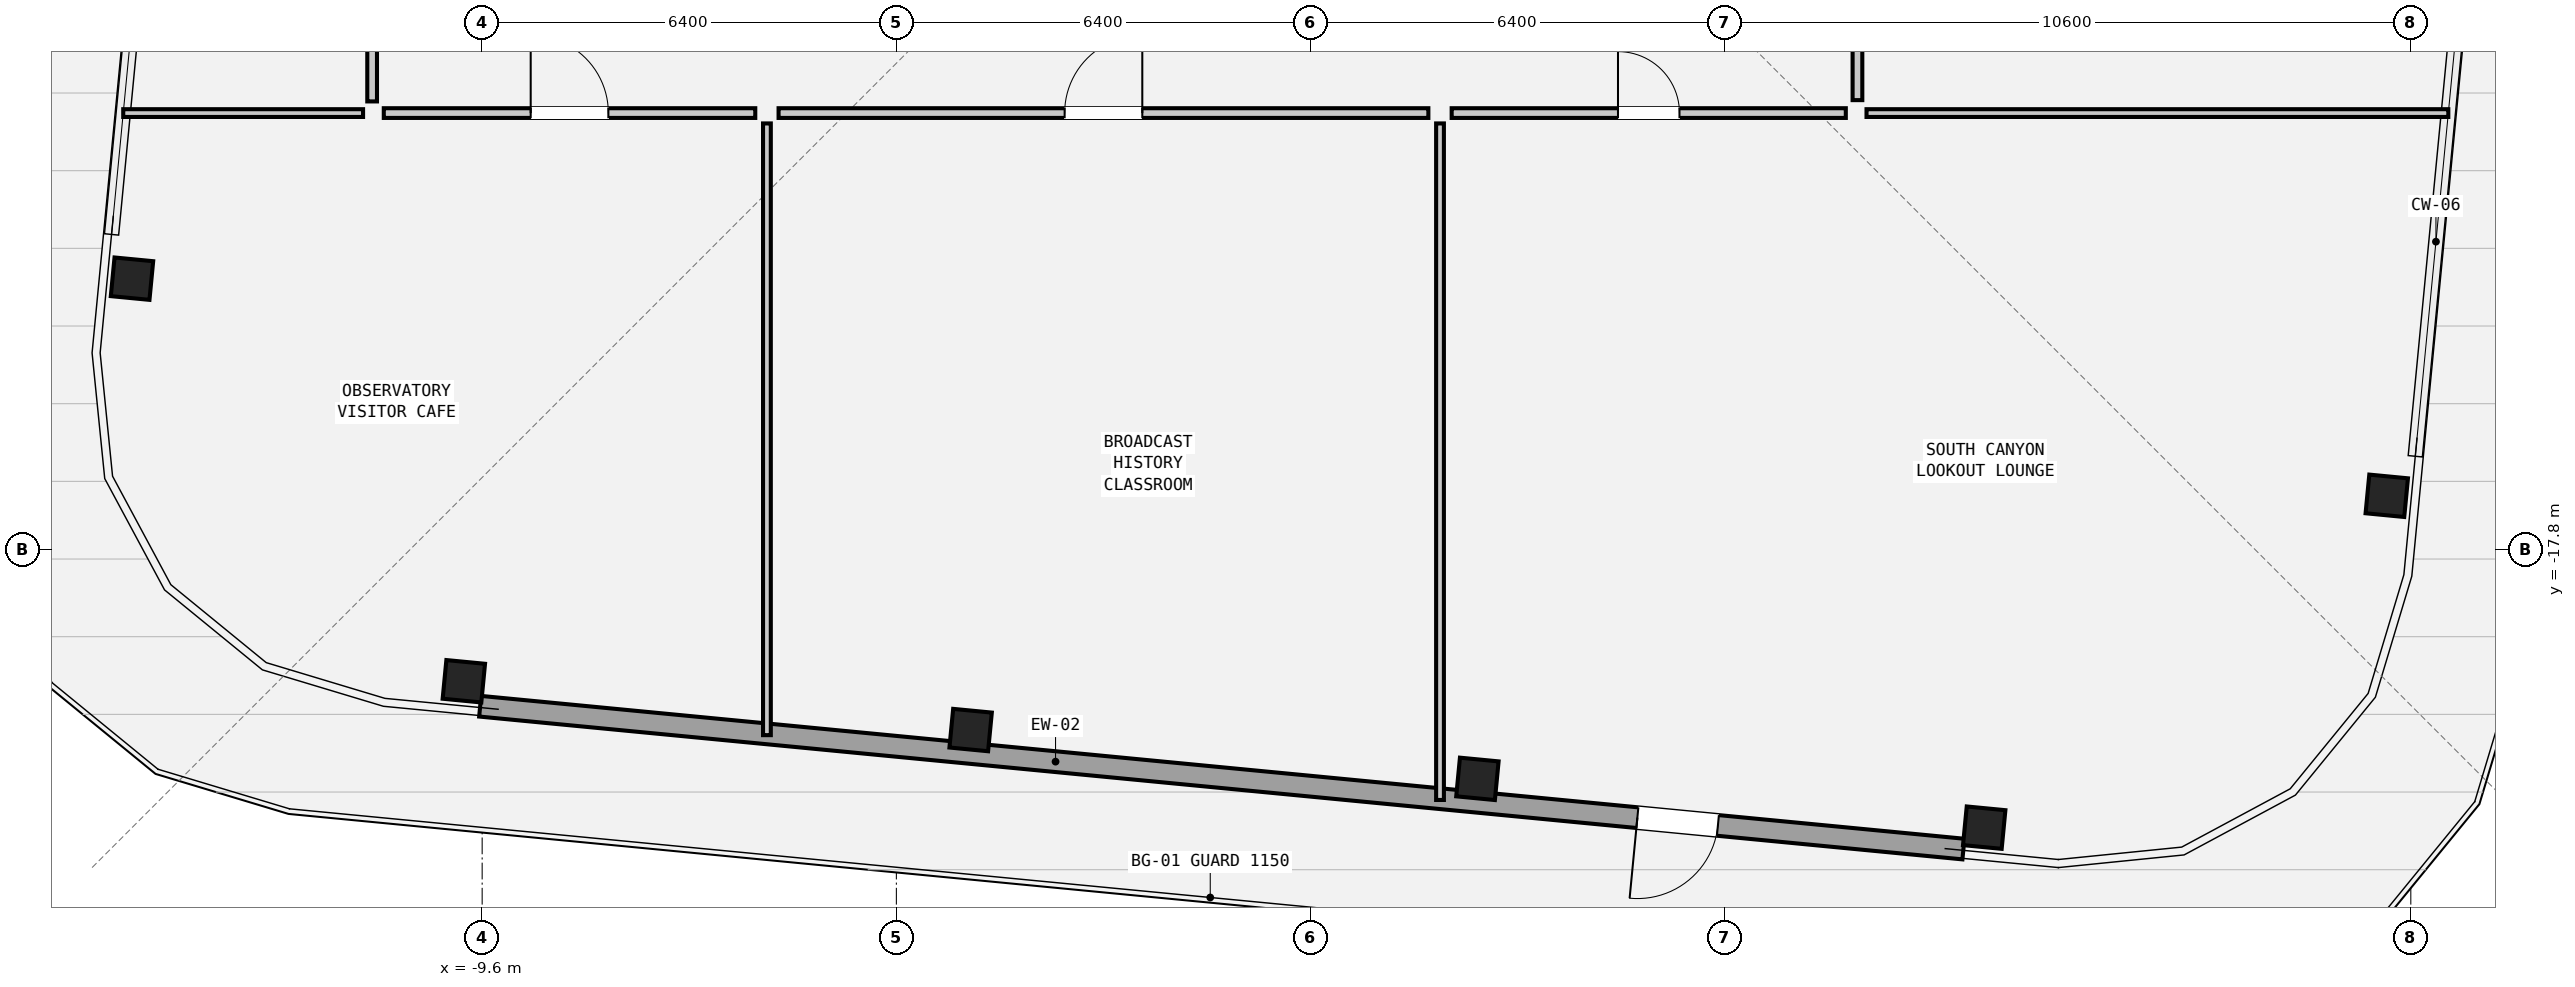
"""IFC4 building model, lengths in metres.
Left out: names, types, materials, properties, quantities, classifications, styles, units other than length and angle.
Written with IfcOpenShell. Run it as: python <this file> out.ifc"""

import sys

from ifc_helpers import new_model, si_unit, direction, frame, frame_2d, origin, origin_2d, place, context, subcontext, project, spatial, rectangle, hollow_rectangle, extrude, element, fill, save


model = new_model("IFC4")
c1 = context("Model", 3, precision=1e-05, world=origin(), true_north=direction((0.0, 1.0)))
c2 = subcontext(c1, "Body", "Model", "MODEL_VIEW")
j1 = project(units=[si_unit("LENGTHUNIT", "METRE"), si_unit("PLANEANGLEUNIT", "RADIAN")], contexts=[c1])
p1 = place(None, origin())
s1 = spatial("IfcSite", under=j1, at=p1, CompositionType="ELEMENT")
p2 = place(p1, origin())
s2 = spatial("IfcBuilding", under=s1, at=p2, CompositionType="ELEMENT")
p3 = place(p2, frame((0.0, 0.0, 280.55)))
s3 = spatial("IfcBuildingStorey", under=s2, at=p3, CompositionType="ELEMENT", Elevation=280.55)
for number, where, z_axis, x_axis in (
    (1, (-9.883, -19.829, 0.0), (0.0, 0.0, 1.0), (0.995, -0.096, 0.0)),
    (2, (-2.052, -20.583, 0.0), (0.0, 0.0, 1.0), (0.995, -0.096, 0.0)),
    (3, (5.778, -21.336, 0.0), (0.0, 0.0, 1.0), (0.995, -0.096, 0.0)),
    (4, (13.608, -22.09, 0.0), (0.0, 0.0, 1.0), (0.995, -0.096, 0.0)),
    (5, (19.829, -16.963, 0.0), (0.0, 0.0, 1.0), (0.096, 0.995, 0.0)),
    (6, (-15.01, -13.608, 0.0), (0.0, 0.0, 1.0), (0.096, 0.995, 0.0)),
):
    element("IfcColumn", number, at=place(p3, frame(where, z_axis=z_axis, x_axis=x_axis)), inside=s3, PredefinedType="COLUMN", context=c2, shape_type="SweptSolid", body=[
        extrude(hollow_rectangle(XDim=0.6, YDim=0.6, WallThickness=0.04, at=origin_2d()), origin(), (0.0, 0.0, 1.0), 4.35),
    ])
p4 = place(p3, frame((13.287, -22.421, 0.0), z_axis=(0.0, 0.0, 1.0), x_axis=(-0.995396042099, 0.095847375411, 0.0)))
e7 = element("IfcWall", 7, at=p4, inside=s3, PredefinedType="SOLIDWALL", context=c2, shape_type="SweptSolid", body=[
    extrude(rectangle(XDim=23.024, YDim=0.32, at=frame_2d((11.512, 0.0))), origin(), (0.0, 0.0, 1.0), 2.25),
])
p5 = place(p4, frame((3.811, 0.0, 0.0)))
e8 = element("IfcOpeningElement", 8, at=p5, cuts=e7, PredefinedType="OPENING", context=c2, shape_type="SweptSolid", body=[
    extrude(rectangle(XDim=1.25, YDim=2.02, at=frame_2d((0.625, 1.01))), frame((0.0, 0.172, 0.0), z_axis=(0.0, -1.0, 0.0), x_axis=(1.0, 0.0, 0.0)), (0.0, 0.0, 1.0), 0.344),
])
p6 = place(p3, frame((-15.146, -11.05, 0.0), z_axis=(0.0, 0.0, 1.0), x_axis=(1.0, 0.0, 0.0)))
e9 = element("IfcWall", 9, at=p6, inside=s3, PredefinedType="PARTITIONING", context=c2, shape_type="SweptSolid", body=[
    extrude(rectangle(XDim=3.706, YDim=0.12, at=frame_2d((1.853, 0.0))), origin(), (0.0, 0.0, 1.0), 4.07),
])
p7 = place(p3, frame((11.79, -11.05, 0.0), z_axis=(0.0, 0.0, 1.0), x_axis=(1.0, 0.0, 0.0)))
e10 = element("IfcWall", 10, at=p7, inside=s3, PredefinedType="PARTITIONING", context=c2, shape_type="SweptSolid", body=[
    extrude(rectangle(XDim=8.99, YDim=0.12, at=frame_2d((4.495, 0.0))), origin(), (0.0, 0.0, 1.0), 4.07),
])
p8 = place(p3, frame((-5.2, -20.661, 0.0), z_axis=(0.0, 0.0, 1.0), x_axis=(0.0, 1.0, 0.0)))
e11 = element("IfcWall", 11, at=p8, inside=s3, PredefinedType="PARTITIONING", context=c2, shape_type="SweptSolid", body=[
    extrude(rectangle(XDim=9.451, YDim=0.12, at=frame_2d((4.726, 0.0))), origin(), (0.0, 0.0, 1.0), 2.25),
])
p9 = place(p3, frame((5.2, -21.663, 0.0), z_axis=(0.0, 0.0, 1.0), x_axis=(0.0, 1.0, 0.0)))
e12 = element("IfcWall", 12, at=p9, inside=s3, PredefinedType="PARTITIONING", context=c2, shape_type="SweptSolid", body=[
    extrude(rectangle(XDim=10.453, YDim=0.12, at=frame_2d((5.226, 0.0))), origin(), (0.0, 0.0, 1.0), 2.25),
])
p10 = place(p3, frame((-11.12, -11.05, 0.0), z_axis=(0.0, 0.0, 1.0), x_axis=(1.0, 0.0, 0.0)))
e13 = element("IfcWall", 13, at=p10, inside=s3, PredefinedType="PARTITIONING", context=c2, shape_type="SweptSolid", body=[
    extrude(rectangle(XDim=5.74, YDim=0.15, at=frame_2d((2.87, 0.0))), origin(), (0.0, 0.0, 1.0), 4.07),
])
p11 = place(p10, frame((2.27, 0.0, 0.0)))
e14 = element("IfcOpeningElement", 14, at=p11, cuts=e13, PredefinedType="OPENING", context=c2, shape_type="SweptSolid", body=[
    extrude(rectangle(XDim=1.2, YDim=2.1, at=frame_2d((0.6, 1.05))), frame((0.0, 0.087, 0.0), z_axis=(0.0, -1.0, 0.0), x_axis=(1.0, 0.0, 0.0)), (0.0, 0.0, 1.0), 0.174),
])
p12 = place(p3, frame((-5.02, -11.05, 0.0), z_axis=(0.0, 0.0, 1.0), x_axis=(1.0, 0.0, 0.0)))
e15 = element("IfcWall", 15, at=p12, inside=s3, PredefinedType="PARTITIONING", context=c2, shape_type="SweptSolid", body=[
    extrude(rectangle(XDim=10.04, YDim=0.15, at=frame_2d((5.02, 0.0))), origin(), (0.0, 0.0, 1.0), 4.07),
])
p13 = place(p12, frame((4.42, 0.0, 0.0)))
e16 = element("IfcOpeningElement", 16, at=p13, cuts=e15, PredefinedType="OPENING", context=c2, shape_type="SweptSolid", body=[
    extrude(rectangle(XDim=1.2, YDim=2.1, at=frame_2d((0.6, 1.05))), frame((0.0, 0.087, 0.0), z_axis=(0.0, -1.0, 0.0), x_axis=(1.0, 0.0, 0.0)), (0.0, 0.0, 1.0), 0.174),
])
p14 = place(p3, frame((5.38, -11.05, 0.0), z_axis=(0.0, 0.0, 1.0), x_axis=(1.0, 0.0, 0.0)))
e17 = element("IfcWall", 17, at=p14, inside=s3, PredefinedType="PARTITIONING", context=c2, shape_type="SweptSolid", body=[
    extrude(rectangle(XDim=6.09, YDim=0.15, at=frame_2d((3.045, 0.0))), origin(), (0.0, 0.0, 1.0), 2.25),
])
p15 = place(p14, frame((2.57, 0.0, 0.0)))
e18 = element("IfcOpeningElement", 18, at=p15, cuts=e17, PredefinedType="OPENING", context=c2, shape_type="SweptSolid", body=[
    extrude(rectangle(XDim=0.95, YDim=2.1, at=frame_2d((0.475, 1.05))), frame((0.0, 0.087, 0.0), z_axis=(0.0, -1.0, 0.0), x_axis=(1.0, 0.0, 0.0)), (0.0, 0.0, 1.0), 0.174),
])
p16 = place(p3, frame((-11.3, -10.87, 0.0), z_axis=(0.0, 0.0, 1.0), x_axis=(0.0, 1.0, 0.0)))
e19 = element("IfcWall", 19, at=p16, inside=s3, PredefinedType="PARTITIONING", context=c2, shape_type="SweptSolid", body=[
    extrude(rectangle(XDim=7.69, YDim=0.15, at=frame_2d((3.845, 0.0))), origin(), (0.0, 0.0, 1.0), 4.07),
])
p17 = place(p16, frame((3.37, 0.0, 0.0)))
e20 = element("IfcOpeningElement", 20, at=p17, cuts=e19, PredefinedType="OPENING", context=c2, shape_type="SweptSolid", body=[
    extrude(rectangle(XDim=0.95, YDim=2.1, at=frame_2d((0.475, 1.05))), frame((0.0, 0.087, 0.0), z_axis=(0.0, -1.0, 0.0), x_axis=(1.0, 0.0, 0.0)), (0.0, 0.0, 1.0), 0.174),
])
p18 = place(p3, frame((11.65, -10.85, 0.0), z_axis=(0.0, 0.0, 1.0), x_axis=(0.0, 1.0, 0.0)))
e21 = element("IfcWall", 21, at=p18, inside=s3, PredefinedType="PARTITIONING", context=c2, shape_type="SweptSolid", body=[
    extrude(rectangle(XDim=8.29, YDim=0.15, at=frame_2d((4.145, 0.0))), origin(), (0.0, 0.0, 1.0), 4.07),
])
p19 = place(p18, frame((3.545, 0.0, 0.0)))
e22 = element("IfcOpeningElement", 22, at=p19, cuts=e21, PredefinedType="OPENING", context=c2, shape_type="SweptSolid", body=[
    extrude(rectangle(XDim=1.2, YDim=2.1, at=frame_2d((0.6, 1.05))), frame((0.0, 0.087, 0.0), z_axis=(0.0, -1.0, 0.0), x_axis=(1.0, 0.0, 0.0)), (0.0, 0.0, 1.0), 0.174),
])
p20 = place(p5, origin())
e23 = element("IfcDoor", 23, at=p20, inside=s3, OperationType="SINGLE_SWING_RIGHT", PredefinedType="DOOR", context=c2, shape_type="SweptSolid", body=[
    extrude(rectangle(XDim=1.25, YDim=2.02, at=frame_2d((0.625, 1.01))), frame((0.0, 0.025, 0.0), z_axis=(0.0, -1.0, 0.0), x_axis=(1.0, 0.0, 0.0)), (0.0, 0.0, 1.0), 0.05),
])
fill(e8, e23)
p21 = place(p11, origin())
e24 = element("IfcDoor", 24, at=p21, inside=s3, OperationType="SINGLE_SWING_LEFT", PredefinedType="DOOR", context=c2, shape_type="SweptSolid", body=[
    extrude(rectangle(XDim=1.2, YDim=2.1, at=frame_2d((0.6, 1.05))), frame((0.0, 0.025, 0.0), z_axis=(0.0, -1.0, 0.0), x_axis=(1.0, 0.0, 0.0)), (0.0, 0.0, 1.0), 0.05),
])
fill(e14, e24)
p22 = place(p13, origin())
e25 = element("IfcDoor", 25, at=p22, inside=s3, OperationType="SINGLE_SWING_RIGHT", PredefinedType="DOOR", context=c2, shape_type="SweptSolid", body=[
    extrude(rectangle(XDim=1.2, YDim=2.1, at=frame_2d((0.6, 1.05))), frame((0.0, 0.025, 0.0), z_axis=(0.0, -1.0, 0.0), x_axis=(1.0, 0.0, 0.0)), (0.0, 0.0, 1.0), 0.05),
])
fill(e16, e25)
p23 = place(p15, origin())
e26 = element("IfcDoor", 26, at=p23, inside=s3, OperationType="SINGLE_SWING_LEFT", PredefinedType="DOOR", context=c2, shape_type="SweptSolid", body=[
    extrude(rectangle(XDim=0.95, YDim=2.1, at=frame_2d((0.475, 1.05))), frame((0.0, 0.025, 0.0), z_axis=(0.0, -1.0, 0.0), x_axis=(1.0, 0.0, 0.0)), (0.0, 0.0, 1.0), 0.05),
])
fill(e18, e26)
save(model, sys.argv[1])
